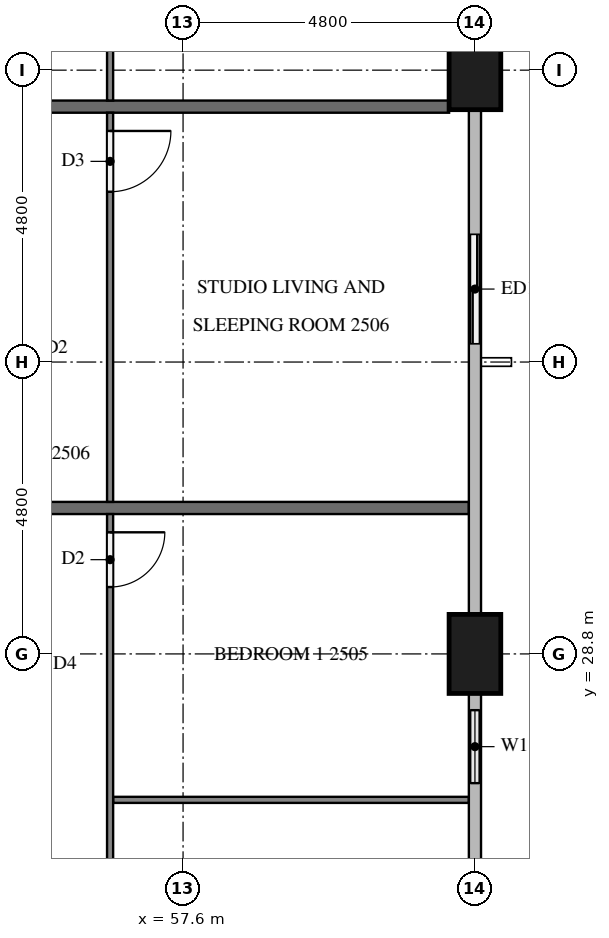
"""IFC4 building model, lengths in metres.
Left out: names, types, materials, properties, quantities, classifications, styles, units other than length and angle.
Written with IfcOpenShell. Run it as: python <this file> out.ifc"""

import sys

from ifc_helpers import new_model, si_unit, direction, frame, frame_2d, origin, origin_2d, place, context, subcontext, project, spatial, rectangle, extrude, element, fill, save


model = new_model("IFC4")
c1 = context("Model", 3, precision=1e-05, world=origin(), true_north=direction((0.0, 1.0)))
c2 = subcontext(c1, "Body", "Model", "MODEL_VIEW")
j1 = project(units=[si_unit("LENGTHUNIT", "METRE"), si_unit("PLANEANGLEUNIT", "RADIAN")], contexts=[c1])
p1 = place(None, origin())
s1 = spatial("IfcSite", under=j1, at=p1, CompositionType="ELEMENT")
p2 = place(p1, origin())
s2 = spatial("IfcBuilding", under=s1, at=p2, CompositionType="ELEMENT")
p3 = place(p2, frame((0.0, 0.0, 99.7)))
s3 = spatial("IfcBuildingStorey", under=s2, at=p3, CompositionType="ELEMENT", Elevation=99.7)
for number, where, z_axis, x_axis in (
    (1, (62.4, 28.8, 0.0), (0.0, 0.0, 1.0), (0.0, 1.0, 0.0)),
    (2, (62.4, 38.4, 0.0), (0.0, 0.0, 1.0), (0.0, 1.0, 0.0)),
):
    element("IfcColumn", number, at=place(p3, frame(where, z_axis=z_axis, x_axis=x_axis)), inside=s3, PredefinedType="COLUMN", context=c2, shape_type="SweptSolid", body=[
        extrude(rectangle(XDim=1.3, YDim=0.85, at=origin_2d()), origin(), (0.0, 0.0, 1.0), 3.2),
    ])
p4 = place(p3, frame((62.4, 26.4, 0.0), z_axis=(0.0, 0.0, 1.0), x_axis=(0.0, 1.0, 0.0)))
e3 = element("IfcWall", 3, at=p4, inside=s3, PredefinedType="SOLIDWALL", context=c2, shape_type="SweptSolid", body=[
    extrude(rectangle(XDim=1.75, YDim=0.15, at=frame_2d((0.875, 0.0))), origin(), (0.0, 0.0, 1.0), 3.2),
])
p5 = place(p4, frame((0.275, 0.0, 0.9)))
e4 = element("IfcOpeningElement", 4, at=p5, cuts=e3, PredefinedType="OPENING", context=c2, shape_type="SweptSolid", body=[
    extrude(rectangle(XDim=1.2, YDim=1.4, at=frame_2d((0.6, 0.7))), frame((0.0, 0.085, 0.0), z_axis=(0.0, -1.0, 0.0), x_axis=(1.0, 0.0, 0.0)), (0.0, 0.0, 1.0), 0.17),
])
p6 = place(p3, frame((62.4, 33.6, 0.0), z_axis=(0.0, 0.0, 1.0), x_axis=(0.0, 1.0, 0.0)))
e5 = element("IfcWall", 5, at=p6, inside=s3, PredefinedType="SOLIDWALL", context=c2, shape_type="SweptSolid", body=[
    extrude(rectangle(XDim=2.4, YDim=0.15, at=frame_2d((1.2, 0.0))), origin(), (0.0, 0.0, 1.0), 3.2),
])
p7 = place(p6, frame((0.3, 0.0, 0.0)))
e6 = element("IfcOpeningElement", 6, at=p7, cuts=e5, PredefinedType="OPENING", context=c2, shape_type="SweptSolid", body=[
    extrude(rectangle(XDim=1.8, YDim=2.4, at=frame_2d((0.9, 1.2))), frame((0.0, 0.085, 0.0), z_axis=(0.0, -1.0, 0.0), x_axis=(1.0, 0.0, 0.0)), (0.0, 0.0, 1.0), 0.17),
])
p8 = place(p3, frame((52.5, 31.2, 0.0), z_axis=(0.0, 0.0, 1.0), x_axis=(1.0, 0.0, 0.0)))
e7 = element("IfcWall", 7, at=p8, inside=s3, PredefinedType="PARTITIONING", context=c2, shape_type="SweptSolid", body=[
    extrude(rectangle(XDim=9.8, YDim=0.2, at=frame_2d((4.9, 0.0))), origin(), (0.0, 0.0, 1.0), 3.2),
])
p9 = place(p3, frame((52.5, 37.8, 0.0), z_axis=(0.0, 0.0, 1.0), x_axis=(1.0, 0.0, 0.0)))
e8 = element("IfcWall", 8, at=p9, inside=s3, PredefinedType="PARTITIONING", context=c2, shape_type="SweptSolid", body=[
    extrude(rectangle(XDim=9.475, YDim=0.2, at=frame_2d((4.738, 0.0))), origin(), (0.0, 0.0, 1.0), 3.2),
])
p10 = place(p3, frame((56.45, 26.4, 0.0), z_axis=(0.0, 0.0, 1.0), x_axis=(1.0, 0.0, 0.0)))
e9 = element("IfcWall", 9, at=p10, inside=s3, PredefinedType="PARTITIONING", context=c2, shape_type="SweptSolid", body=[
    extrude(rectangle(XDim=5.85, YDim=0.1, at=frame_2d((2.925, 0.0))), origin(), (0.0, 0.0, 1.0), 3.2),
])
p11 = place(p3, frame((56.4, 31.1, 0.0), z_axis=(0.0, 0.0, 1.0), x_axis=(0.0, -1.0, 0.0)))
e10 = element("IfcWall", 10, at=p11, inside=s3, PredefinedType="PARTITIONING", context=c2, shape_type="SweptSolid", body=[
    extrude(rectangle(XDim=16.0, YDim=0.1, at=frame_2d((8.0, 0.0))), origin(), (0.0, 0.0, 1.0), 3.2),
])
p12 = place(p11, frame((0.3, 0.0, 0.0)))
e11 = element("IfcOpeningElement", 11, at=p12, cuts=e10, PredefinedType="OPENING", context=c2, shape_type="SweptSolid", body=[
    extrude(rectangle(XDim=0.9, YDim=2.1, at=frame_2d((0.45, 1.05))), frame((0.0, 0.06, 0.0), z_axis=(0.0, -1.0, 0.0), x_axis=(1.0, 0.0, 0.0)), (0.0, 0.0, 1.0), 0.12),
])
p13 = place(p11, frame((8.25, 0.0, 0.0)))
e12 = element("IfcOpeningElement", 12, at=p13, cuts=e10, PredefinedType="OPENING", context=c2, shape_type="SweptSolid", body=[
    extrude(rectangle(XDim=0.9, YDim=2.1, at=frame_2d((0.45, 1.05))), frame((0.0, 0.06, 0.0), z_axis=(0.0, -1.0, 0.0), x_axis=(1.0, 0.0, 0.0)), (0.0, 0.0, 1.0), 0.12),
])
p14 = place(p11, frame((9.85, 0.0, 0.0)))
e13 = element("IfcOpeningElement", 13, at=p14, cuts=e10, PredefinedType="OPENING", context=c2, shape_type="SweptSolid", body=[
    extrude(rectangle(XDim=1.0, YDim=2.1, at=frame_2d((0.5, 1.05))), frame((0.0, 0.06, 0.0), z_axis=(0.0, -1.0, 0.0), x_axis=(1.0, 0.0, 0.0)), (0.0, 0.0, 1.0), 0.12),
])
p15 = place(p3, frame((56.4, 37.7, 0.0), z_axis=(0.0, 0.0, 1.0), x_axis=(0.0, -1.0, 0.0)))
e14 = element("IfcWall", 14, at=p15, inside=s3, PredefinedType="PARTITIONING", context=c2, shape_type="SweptSolid", body=[
    extrude(rectangle(XDim=6.4, YDim=0.1, at=frame_2d((3.2, 0.0))), origin(), (0.0, 0.0, 1.0), 3.2),
])
p16 = place(p15, frame((0.3, 0.0, 0.0)))
e15 = element("IfcOpeningElement", 15, at=p16, cuts=e14, PredefinedType="OPENING", context=c2, shape_type="SweptSolid", body=[
    extrude(rectangle(XDim=1.0, YDim=2.1, at=frame_2d((0.5, 1.05))), frame((0.0, 0.06, 0.0), z_axis=(0.0, -1.0, 0.0), x_axis=(1.0, 0.0, 0.0)), (0.0, 0.0, 1.0), 0.12),
])
p17 = place(p3, frame((56.4, 52.7, 0.0), z_axis=(0.0, 0.0, 1.0), x_axis=(0.0, -1.0, 0.0)))
e16 = element("IfcWall", 16, at=p17, inside=s3, PredefinedType="PARTITIONING", context=c2, shape_type="SweptSolid", body=[
    extrude(rectangle(XDim=14.8, YDim=0.1, at=frame_2d((7.4, 0.0))), origin(), (0.0, 0.0, 1.0), 3.2),
])
p18 = place(p17, frame((9.85, 0.0, 0.0)))
e17 = element("IfcOpeningElement", 17, at=p18, cuts=e16, PredefinedType="OPENING", context=c2, shape_type="SweptSolid", body=[
    extrude(rectangle(XDim=0.9, YDim=2.1, at=frame_2d((0.45, 1.05))), frame((0.0, 0.06, 0.0), z_axis=(0.0, -1.0, 0.0), x_axis=(1.0, 0.0, 0.0)), (0.0, 0.0, 1.0), 0.12),
])
p19 = place(p17, frame((8.15, 0.0, 0.0)))
e18 = element("IfcOpeningElement", 18, at=p19, cuts=e16, PredefinedType="OPENING", context=c2, shape_type="SweptSolid", body=[
    extrude(rectangle(XDim=1.0, YDim=2.1, at=frame_2d((0.5, 1.05))), frame((0.0, 0.06, 0.0), z_axis=(0.0, -1.0, 0.0), x_axis=(1.0, 0.0, 0.0)), (0.0, 0.0, 1.0), 0.12),
])
p20 = place(p17, frame((0.5, 0.0, 0.0)))
e19 = element("IfcOpeningElement", 19, at=p20, cuts=e16, PredefinedType="OPENING", context=c2, shape_type="SweptSolid", body=[
    extrude(rectangle(XDim=0.9, YDim=2.1, at=frame_2d((0.45, 1.05))), frame((0.0, 0.06, 0.0), z_axis=(0.0, -1.0, 0.0), x_axis=(1.0, 0.0, 0.0)), (0.0, 0.0, 1.0), 0.12),
])
p21 = place(p5, origin())
e20 = element("IfcWindow", 20, at=p21, inside=s3, PartitioningType="SINGLE_PANEL", PredefinedType="WINDOW", context=c2, shape_type="SweptSolid", body=[
    extrude(rectangle(XDim=1.2, YDim=1.4, at=frame_2d((0.6, 0.7))), frame((0.0, 0.03, 0.0), z_axis=(0.0, -1.0, 0.0), x_axis=(1.0, 0.0, 0.0)), (0.0, 0.0, 1.0), 0.06),
])
fill(e4, e20)
p22 = place(p7, origin())
e21 = element("IfcDoor", 21, at=p22, inside=s3, OperationType="SLIDING_TO_RIGHT", PredefinedType="DOOR", context=c2, shape_type="SweptSolid", body=[
    extrude(rectangle(XDim=1.8, YDim=2.4, at=frame_2d((0.9, 1.2))), frame((0.0, 0.025, 0.0), z_axis=(0.0, -1.0, 0.0), x_axis=(1.0, 0.0, 0.0)), (0.0, 0.0, 1.0), 0.05),
])
fill(e6, e21)
p23 = place(p12, origin())
e22 = element("IfcDoor", 22, at=p23, inside=s3, OperationType="SINGLE_SWING_LEFT", PredefinedType="DOOR", context=c2, shape_type="SweptSolid", body=[
    extrude(rectangle(XDim=0.9, YDim=2.1, at=frame_2d((0.45, 1.05))), frame((0.0, 0.025, 0.0), z_axis=(0.0, -1.0, 0.0), x_axis=(1.0, 0.0, 0.0)), (0.0, 0.0, 1.0), 0.05),
])
fill(e11, e22)
p24 = place(p16, origin())
e23 = element("IfcDoor", 23, at=p24, inside=s3, OperationType="SINGLE_SWING_LEFT", PredefinedType="DOOR", context=c2, shape_type="SweptSolid", body=[
    extrude(rectangle(XDim=1.0, YDim=2.1, at=frame_2d((0.5, 1.05))), frame((0.0, 0.025, 0.0), z_axis=(0.0, -1.0, 0.0), x_axis=(1.0, 0.0, 0.0)), (0.0, 0.0, 1.0), 0.05),
])
fill(e15, e23)
save(model, sys.argv[1])
